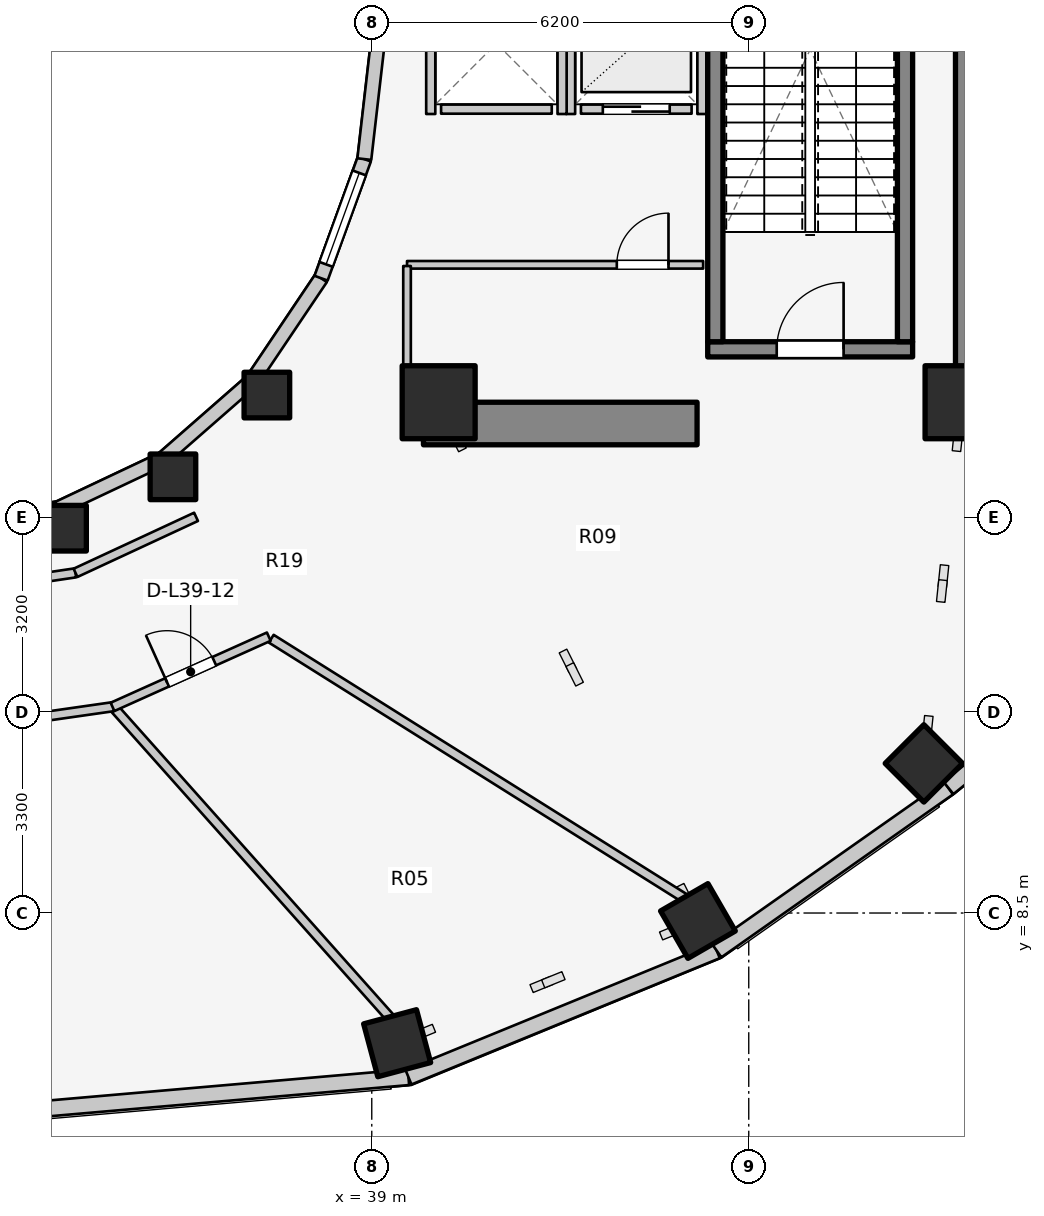
"""IFC4 building model, lengths in metres.
Left out: names, types, materials, properties, quantities, classifications, styles, units other than length and angle.
Written with IfcOpenShell. Run it as: python <this file> out.ifc"""

import sys

from ifc_helpers import new_model, si_unit, direction, frame, frame_2d, origin, origin_2d, place, context, subcontext, project, spatial, rectangle, extrude, element, fill, save


model = new_model("IFC4")
c1 = context("Model", 3, precision=1e-05, world=origin(), true_north=direction((0.0, 1.0)))
c2 = subcontext(c1, "Body", "Model", "MODEL_VIEW")
j1 = project(units=[si_unit("LENGTHUNIT", "METRE"), si_unit("PLANEANGLEUNIT", "RADIAN")], contexts=[c1])
p1 = place(None, origin())
s1 = spatial("IfcSite", under=j1, at=p1, CompositionType="ELEMENT")
p2 = place(p1, origin())
s2 = spatial("IfcBuilding", under=s1, at=p2, CompositionType="ELEMENT")
p3 = place(p2, frame((0.0, 0.0, 129.0)))
s3 = spatial("IfcBuildingStorey", under=s2, at=p3, CompositionType="ELEMENT", Elevation=129.0)
p4 = place(p3, frame((48.95, 17.05, 0.0), z_axis=(0.0, 0.0, 1.0), x_axis=(0.0, 1.0, 0.0)))
e1 = element("IfcWall", 1, at=p4, inside=s3, PredefinedType="SHEAR", context=c2, shape_type="SweptSolid", body=[
    extrude(rectangle(XDim=12.8, YDim=0.7, at=frame_2d((6.4, 0.0))), origin(), (0.0, 0.0, 1.0), 4.2),
])
p5 = place(p3, frame((39.85, 16.55, 0.0), z_axis=(0.0, 0.0, 1.0), x_axis=(1.0, 0.0, 0.0)))
e2 = element("IfcWall", 2, at=p5, inside=s3, PredefinedType="SHEAR", context=c2, shape_type="SweptSolid", body=[
    extrude(rectangle(XDim=4.5, YDim=0.7, at=frame_2d((2.25, 0.0))), origin(), (0.0, 0.0, 1.0), 4.2),
])
p6 = place(p3, frame((44.525, 17.77, 0.0), z_axis=(0.0, 0.0, 1.0), x_axis=(1.0, 0.0, 0.0)))
e3 = element("IfcWall", 3, at=p6, inside=s3, PredefinedType="SOLIDWALL", context=c2, shape_type="SweptSolid", body=[
    extrude(rectangle(XDim=3.37, YDim=0.25, at=frame_2d((1.685, 0.0))), origin(), (0.0, 0.0, 1.0), 4.2),
])
p7 = place(p6, frame((1.135, 0.0, 0.0)))
e4 = element("IfcOpeningElement", 4, at=p7, cuts=e3, PredefinedType="OPENING", context=c2, shape_type="SweptSolid", body=[
    extrude(rectangle(XDim=1.1, YDim=2.1, at=frame_2d((0.55, 1.05))), frame((0.0, 0.135, 0.0), z_axis=(0.0, -1.0, 0.0), x_axis=(1.0, 0.0, 0.0)), (0.0, 0.0, 1.0), 0.27),
])
for number, where, z_axis, x_axis in (
    (5, (44.65, 17.895, 0.0), (0.0, 0.0, 1.0), (0.0, 1.0, 0.0)),
    (6, (47.77, 17.895, 0.0), (0.0, 0.0, 1.0), (0.0, 1.0, 0.0)),
):
    element("IfcWall", number, at=place(p3, frame(where, z_axis=z_axis, x_axis=x_axis)), inside=s3, PredefinedType="SOLIDWALL", context=c2, shape_type="SweptSolid", body=[
        extrude(rectangle(XDim=7.81, YDim=0.25, at=frame_2d((3.905, 0.0))), origin(), (0.0, 0.0, 1.0), 4.2),
    ])
for number, where, z_axis, x_axis in (
    (7, (40.1, 16.9, 0.0), (0.0, 0.0, 1.0), (1.0, 0.0, 0.0)),
    (8, (48.7, 16.9, 0.0), (0.0, 0.0, 1.0), (1.0, 0.0, 0.0)),
):
    element("IfcColumn", number, at=place(p3, frame(where, z_axis=z_axis, x_axis=x_axis)), inside=s3, PredefinedType="COLUMN", context=c2, shape_type="SweptSolid", body=[
        extrude(rectangle(XDim=1.2, YDim=1.2, at=origin_2d()), origin(), (0.0, 0.0, 1.0), 4.2),
    ])
p8 = place(p3, frame((33.931, 14.828, 0.0), z_axis=(0.0, 0.0, 1.0), x_axis=(1.0, 0.0, 0.0)))
e9 = element("IfcColumn", 9, at=p8, inside=s3, PredefinedType="COLUMN", context=c2, shape_type="SweptSolid", body=[
    extrude(rectangle(XDim=0.75, YDim=0.75, at=origin_2d()), origin(), (0.0, 0.0, 1.0), 4.2),
])
p9 = place(p3, frame((39.417, 6.359, 0.0), z_axis=(0.0, 0.0, 1.0), x_axis=(0.258819045103, -0.965925826289, 0.0)))
e10 = element("IfcColumn", 10, at=p9, inside=s3, PredefinedType="COLUMN", context=c2, shape_type="SweptSolid", body=[
    extrude(rectangle(XDim=0.9, YDim=0.9, at=origin_2d()), origin(), (0.0, 0.0, 1.0), 4.2),
])
p10 = place(p3, frame((35.73, 15.673, 0.0), z_axis=(0.0, 0.0, 1.0), x_axis=(1.0, 0.0, 0.0)))
e11 = element("IfcColumn", 11, at=p10, inside=s3, PredefinedType="COLUMN", context=c2, shape_type="SweptSolid", body=[
    extrude(rectangle(XDim=0.75, YDim=0.75, at=origin_2d()), origin(), (0.0, 0.0, 1.0), 4.2),
])
p11 = place(p3, frame((44.364, 8.369, 0.0), z_axis=(0.0, 0.0, 1.0), x_axis=(0.5, -0.866025403784, 0.0)))
e12 = element("IfcColumn", 12, at=p11, inside=s3, PredefinedType="COLUMN", context=c2, shape_type="SweptSolid", body=[
    extrude(rectangle(XDim=0.9, YDim=0.9, at=origin_2d()), origin(), (0.0, 0.0, 1.0), 4.2),
])
p12 = place(p3, frame((37.275, 17.018, 0.0), z_axis=(0.0, 0.0, 1.0), x_axis=(1.0, 0.0, 0.0)))
e13 = element("IfcColumn", 13, at=p12, inside=s3, PredefinedType="COLUMN", context=c2, shape_type="SweptSolid", body=[
    extrude(rectangle(XDim=0.75, YDim=0.75, at=origin_2d()), origin(), (0.0, 0.0, 1.0), 4.2),
])
p13 = place(p3, frame((48.08, 10.961, 0.0), z_axis=(0.0, 0.0, 1.0), x_axis=(0.707106781187, -0.707106781187, 0.0)))
e14 = element("IfcColumn", 14, at=p13, inside=s3, PredefinedType="COLUMN", context=c2, shape_type="SweptSolid", body=[
    extrude(rectangle(XDim=0.9, YDim=0.9, at=origin_2d()), origin(), (0.0, 0.0, 1.0), 4.2),
])
p14 = place(p3, frame((32.0, 14.88, 0.0), z_axis=(0.0, 0.0, 1.0), x_axis=(0.988901730308, 0.148571086668, 0.0)))
e15 = element("IfcWall", 15, at=p14, inside=s3, PredefinedType="STANDARD", context=c2, shape_type="SweptSolid", body=[
    extrude(rectangle(XDim=1.864, YDim=0.23, at=frame_2d((0.932, 0.0))), origin(), (0.0, 0.0, 1.0), 2.32),
])
p15 = place(p3, frame((33.843, 15.157, 0.0), z_axis=(0.0, 0.0, 1.0), x_axis=(0.904179699603, 0.427152280606, 0.0)))
e16 = element("IfcWall", 16, at=p15, inside=s3, PredefinedType="STANDARD", context=c2, shape_type="SweptSolid", body=[
    extrude(rectangle(XDim=1.899, YDim=0.23, at=frame_2d((0.95, 0.0))), origin(), (0.0, 0.0, 1.0), 2.32),
])
p16 = place(p3, frame((35.56, 15.968, 0.0), z_axis=(0.0, 0.0, 1.0), x_axis=(0.752576694707, 0.658504607869, 0.0)))
e17 = element("IfcWall", 17, at=p16, inside=s3, PredefinedType="STANDARD", context=c2, shape_type="SweptSolid", body=[
    extrude(rectangle(XDim=1.959, YDim=0.23, at=frame_2d((0.98, 0.0))), origin(), (0.0, 0.0, 1.0), 2.32),
])
p17 = place(p3, frame((37.035, 17.258, 0.0), z_axis=(0.0, 0.0, 1.0), x_axis=(0.558197800898, 0.829707909492, 0.0)))
e18 = element("IfcWall", 18, at=p17, inside=s3, PredefinedType="STANDARD", context=c2, shape_type="SweptSolid", body=[
    extrude(rectangle(XDim=2.027, YDim=0.23, at=frame_2d((1.013, 0.0))), origin(), (0.0, 0.0, 1.0), 2.32),
])
p18 = place(p3, frame((38.166, 18.94, 0.0), z_axis=(0.0, 0.0, 1.0), x_axis=(0.341423187295, 0.93990968033, 0.0)))
e19 = element("IfcWall", 19, at=p18, inside=s3, PredefinedType="STANDARD", context=c2, shape_type="SweptSolid", body=[
    extrude(rectangle(XDim=2.084, YDim=0.23, at=frame_2d((1.042, 0.0))), origin(), (0.0, 0.0, 1.0), 2.8),
])
p19 = place(p18, frame((0.242, 0.0, 0.85)))
e20 = element("IfcOpeningElement", 20, at=p19, cuts=e19, PredefinedType="OPENING", context=c2, shape_type="SweptSolid", body=[
    extrude(rectangle(XDim=1.6, YDim=1.65, at=frame_2d((0.8, 0.825))), frame((0.0, 0.125, 0.0), z_axis=(0.0, -1.0, 0.0), x_axis=(1.0, 0.0, 0.0)), (0.0, 0.0, 1.0), 0.25),
])
p20 = place(p3, frame((38.877, 20.898, 0.0), z_axis=(0.0, 0.0, 1.0), x_axis=(0.114711713601, 0.993398823617, 0.0)))
e21 = element("IfcWall", 21, at=p20, inside=s3, PredefinedType="STANDARD", context=c2, shape_type="SweptSolid", body=[
    extrude(rectangle(XDim=2.115, YDim=0.23, at=frame_2d((1.058, 0.0))), origin(), (0.0, 0.0, 1.0), 2.8),
])
p21 = place(p3, frame((32.0, 5.14, 0.0), z_axis=(0.0, 0.0, 1.0), x_axis=(0.996249584918, 0.086526091739, 0.0)))
e22 = element("IfcWall", 22, at=p21, inside=s3, PredefinedType="STANDARD", context=c2, shape_type="SweptSolid", body=[
    extrude(rectangle(XDim=7.632, YDim=0.26, at=frame_2d((3.816, 0.0))), origin(), (0.0, 0.0, 1.0), 2.32),
])
p22 = place(p3, frame((39.604, 5.8, 0.0), z_axis=(0.0, 0.0, 1.0), x_axis=(0.925369447545, 0.379066465875, 0.0)))
e23 = element("IfcWall", 23, at=p22, inside=s3, PredefinedType="STANDARD", context=c2, shape_type="SweptSolid", body=[
    extrude(rectangle(XDim=5.48, YDim=0.26, at=frame_2d((2.74, 0.0))), origin(), (0.0, 0.0, 1.0), 2.32),
])
p23 = place(p3, frame((44.675, 7.878, 0.0), z_axis=(0.0, 0.0, 1.0), x_axis=(0.817976353794, 0.575251844529, 0.0)))
e24 = element("IfcWall", 24, at=p23, inside=s3, PredefinedType="STANDARD", context=c2, shape_type="SweptSolid", body=[
    extrude(rectangle(XDim=4.657, YDim=0.26, at=frame_2d((2.329, 0.0))), origin(), (0.0, 0.0, 1.0), 2.32),
])
p24 = place(p3, frame((48.484, 10.557, 0.0), z_axis=(0.0, 0.0, 1.0), x_axis=(0.776963479771, 0.629545670387, 0.0)))
e25 = element("IfcWall", 25, at=p24, inside=s3, PredefinedType="STANDARD", context=c2, shape_type="SweptSolid", body=[
    extrude(rectangle(XDim=4.568, YDim=0.26, at=frame_2d((2.284, 0.0))), origin(), (0.0, 0.0, 1.0), 2.32),
])
p25 = place(p3, frame((42.44, 21.72, 0.0), z_axis=(0.0, 0.0, 1.0), x_axis=(1.0, 0.0, 0.0)))
e26 = element("IfcWall", 26, at=p25, inside=s3, PredefinedType="SOLIDWALL", context=c2, shape_type="SweptSolid", body=[
    extrude(rectangle(XDim=1.82, YDim=0.15, at=frame_2d((0.91, 0.0))), origin(), (0.0, 0.0, 1.0), 3.675),
])
p26 = place(p25, frame((0.36, 0.0, 0.0)))
e27 = element("IfcOpeningElement", 27, at=p26, cuts=e26, PredefinedType="OPENING", context=c2, shape_type="SweptSolid", body=[
    extrude(rectangle(XDim=1.1, YDim=2.1, at=frame_2d((0.55, 1.05))), frame((0.0, 0.085, 0.0), z_axis=(0.0, -1.0, 0.0), x_axis=(1.0, 0.0, 0.0)), (0.0, 0.0, 1.0), 0.17),
])
for number, where, z_axis, x_axis in (
    (28, (42.27, 21.64, 0.0), (0.0, 0.0, 1.0), (0.0, 1.0, 0.0)),
    (29, (44.43, 21.64, 0.0), (0.0, 0.0, 1.0), (0.0, 1.0, 0.0)),
):
    element("IfcWall", number, at=place(p3, frame(where, z_axis=z_axis, x_axis=x_axis)), inside=s3, PredefinedType="SOLIDWALL", context=c2, shape_type="SweptSolid", body=[
        extrude(rectangle(XDim=2.32, YDim=0.15, at=frame_2d((1.16, 0.0))), origin(), (0.0, 0.0, 1.0), 3.675),
    ])
p27 = place(p3, frame((40.14, 21.72, 0.0), z_axis=(0.0, 0.0, 1.0), x_axis=(1.0, 0.0, 0.0)))
e30 = element("IfcWall", 30, at=p27, inside=s3, PredefinedType="SOLIDWALL", context=c2, shape_type="SweptSolid", body=[
    extrude(rectangle(XDim=1.82, YDim=0.15, at=frame_2d((0.91, 0.0))), origin(), (0.0, 0.0, 1.0), 3.22),
])
p28 = place(p3, frame((39.97, 21.64, 0.0), z_axis=(0.0, 0.0, 1.0), x_axis=(0.0, 1.0, 0.0)))
e31 = element("IfcWall", 31, at=p28, inside=s3, PredefinedType="SOLIDWALL", context=c2, shape_type="SweptSolid", body=[
    extrude(rectangle(XDim=2.32, YDim=0.15, at=frame_2d((1.16, 0.0))), origin(), (0.0, 0.0, 1.0), 3.22),
])
p29 = place(p3, frame((42.13, 21.64, 0.0), z_axis=(0.0, 0.0, 1.0), x_axis=(0.0, 1.0, 0.0)))
e32 = element("IfcWall", 32, at=p29, inside=s3, PredefinedType="SOLIDWALL", context=c2, shape_type="SweptSolid", body=[
    extrude(rectangle(XDim=2.32, YDim=0.15, at=frame_2d((1.16, 0.0))), origin(), (0.0, 0.0, 1.0), 3.675),
])
p30 = place(p3, frame((39.58, 19.16, 0.0), z_axis=(0.0, 0.0, 1.0), x_axis=(1.0, 0.0, 0.0)))
e33 = element("IfcWall", 33, at=p30, inside=s3, PredefinedType="PARTITIONING", context=c2, shape_type="SweptSolid", body=[
    extrude(rectangle(XDim=4.87, YDim=0.125, at=frame_2d((2.435, 0.0))), origin(), (0.0, 0.0, 1.0), 3.22),
])
p31 = place(p30, frame((3.45, 0.0, 0.0)))
e34 = element("IfcOpeningElement", 34, at=p31, cuts=e33, PredefinedType="OPENING", context=c2, shape_type="SweptSolid", body=[
    extrude(rectangle(XDim=0.85, YDim=2.05, at=frame_2d((0.425, 1.025))), frame((0.0, 0.073, 0.0), z_axis=(0.0, -1.0, 0.0), x_axis=(1.0, 0.0, 0.0)), (0.0, 0.0, 1.0), 0.145),
])
p32 = place(p3, frame((39.58, 17.1, 0.0), z_axis=(0.0, 0.0, 1.0), x_axis=(0.0, 1.0, 0.0)))
e35 = element("IfcWall", 35, at=p32, inside=s3, PredefinedType="PARTITIONING", context=c2, shape_type="SweptSolid", body=[
    extrude(rectangle(XDim=2.04, YDim=0.125, at=frame_2d((1.02, 0.0))), origin(), (0.0, 0.0, 1.0), 3.052),
])
p33 = place(p3, frame((32.0, 13.78, 0.0), z_axis=(0.0, 0.0, 1.0), x_axis=(0.989268584896, 0.146108408166, 0.0)))
e36 = element("IfcWall", 36, at=p33, inside=s3, PredefinedType="PARTITIONING", context=c2, shape_type="SweptSolid", body=[
    extrude(rectangle(XDim=2.151, YDim=0.15, at=frame_2d((1.075, 0.0))), origin(), (0.0, 0.0, 1.0), 3.119),
])
p34 = place(p3, frame((34.127, 14.094, 0.0), z_axis=(0.0, 0.0, 1.0), x_axis=(0.906943449489, 0.421252393975, 0.0)))
e37 = element("IfcWall", 37, at=p34, inside=s3, PredefinedType="PARTITIONING", context=c2, shape_type="SweptSolid", body=[
    extrude(rectangle(XDim=2.186, YDim=0.15, at=frame_2d((1.093, 0.0))), origin(), (0.0, 0.0, 1.0), 2.32),
])
p35 = place(p3, frame((34.78, 11.851, 0.0), z_axis=(0.0, 0.0, 1.0), x_axis=(0.665492718471, -0.746404341937, 0.0)))
e38 = element("IfcWall", 38, at=p35, inside=s3, PredefinedType="PARTITIONING", context=c2, shape_type="SweptSolid", body=[
    extrude(rectangle(XDim=6.801, YDim=0.15, at=frame_2d((3.401, 0.0))), origin(), (0.0, 0.0, 1.0), 2.32),
])
p36 = place(p3, frame((37.347, 13.011, 0.0), z_axis=(0.0, 0.0, 1.0), x_axis=(0.846958426242, -0.531659124081, 0.0)))
e39 = element("IfcWall", 39, at=p36, inside=s3, PredefinedType="PARTITIONING", context=c2, shape_type="SweptSolid", body=[
    extrude(rectangle(XDim=8.032, YDim=0.15, at=frame_2d((4.016, 0.0))), origin(), (0.0, 0.0, 1.0), 2.32),
])
p37 = place(p3, frame((31.998, 11.5, 0.0), z_axis=(0.0, 0.0, 1.0), x_axis=(0.989919617721, 0.141630330263, 0.0)))
e40 = element("IfcWall", 40, at=p37, inside=s3, PredefinedType="PARTITIONING", context=c2, shape_type="SweptSolid", body=[
    extrude(rectangle(XDim=2.781, YDim=0.15, at=frame_2d((1.39, 0.0))), origin(), (0.0, 0.0, 1.0), 3.119),
])
p38 = place(p3, frame((34.736, 11.89, 0.0), z_axis=(0.0, 0.0, 1.0), x_axis=(0.912153204049, 0.409849402028, 0.0)))
e41 = element("IfcWall", 41, at=p38, inside=s3, PredefinedType="PARTITIONING", context=c2, shape_type="SweptSolid", body=[
    extrude(rectangle(XDim=2.818, YDim=0.15, at=frame_2d((1.409, 0.0))), origin(), (0.0, 0.0, 1.0), 3.119),
])
p39 = place(p38, frame((0.984, 0.0, 0.0)))
e42 = element("IfcOpeningElement", 42, at=p39, cuts=e41, PredefinedType="OPENING", context=c2, shape_type="SweptSolid", body=[
    extrude(rectangle(XDim=0.85, YDim=2.05, at=frame_2d((0.425, 1.025))), frame((0.0, 0.085, 0.0), z_axis=(0.0, -1.0, 0.0), x_axis=(1.0, 0.0, 0.0)), (0.0, 0.0, 1.0), 0.17),
])
p40 = place(p19, origin())
e43 = element("IfcWindow", 43, at=p40, inside=s3, PartitioningType="SINGLE_PANEL", PredefinedType="WINDOW", context=c2, shape_type="SweptSolid", body=[
    extrude(rectangle(XDim=1.6, YDim=1.65, at=frame_2d((0.8, 0.825))), frame((0.0, 0.03, 0.0), z_axis=(0.0, -1.0, 0.0), x_axis=(1.0, 0.0, 0.0)), (0.0, 0.0, 1.0), 0.06),
])
fill(e20, e43)
p41 = place(p7, origin())
e44 = element("IfcDoor", 44, at=p41, inside=s3, OperationType="SINGLE_SWING_RIGHT", PredefinedType="DOOR", context=c2, shape_type="SweptSolid", body=[
    extrude(rectangle(XDim=1.1, YDim=2.1, at=frame_2d((0.55, 1.05))), frame((0.0, 0.025, 0.0), z_axis=(0.0, -1.0, 0.0), x_axis=(1.0, 0.0, 0.0)), (0.0, 0.0, 1.0), 0.05),
])
fill(e4, e44)
p42 = place(p26, origin())
e45 = element("IfcDoor", 45, at=p42, inside=s3, OperationType="DOUBLE_DOOR_SLIDING", PredefinedType="DOOR", context=c2, shape_type="SweptSolid", body=[
    extrude(rectangle(XDim=1.1, YDim=2.1, at=frame_2d((0.55, 1.05))), frame((0.0, 0.025, 0.0), z_axis=(0.0, -1.0, 0.0), x_axis=(1.0, 0.0, 0.0)), (0.0, 0.0, 1.0), 0.05),
])
fill(e27, e45)
p43 = place(p31, origin())
e46 = element("IfcDoor", 46, at=p43, inside=s3, OperationType="SINGLE_SWING_RIGHT", PredefinedType="DOOR", context=c2, shape_type="SweptSolid", body=[
    extrude(rectangle(XDim=0.85, YDim=2.05, at=frame_2d((0.425, 1.025))), frame((0.0, 0.025, 0.0), z_axis=(0.0, -1.0, 0.0), x_axis=(1.0, 0.0, 0.0)), (0.0, 0.0, 1.0), 0.05),
])
fill(e34, e46)
p44 = place(p39, origin())
e47 = element("IfcDoor", 47, at=p44, inside=s3, OperationType="SINGLE_SWING_LEFT", PredefinedType="DOOR", context=c2, shape_type="SweptSolid", body=[
    extrude(rectangle(XDim=0.85, YDim=2.05, at=frame_2d((0.425, 1.025))), frame((0.0, 0.025, 0.0), z_axis=(0.0, -1.0, 0.0), x_axis=(1.0, 0.0, 0.0)), (0.0, 0.0, 1.0), 0.05),
])
fill(e42, e47)
save(model, sys.argv[1])
